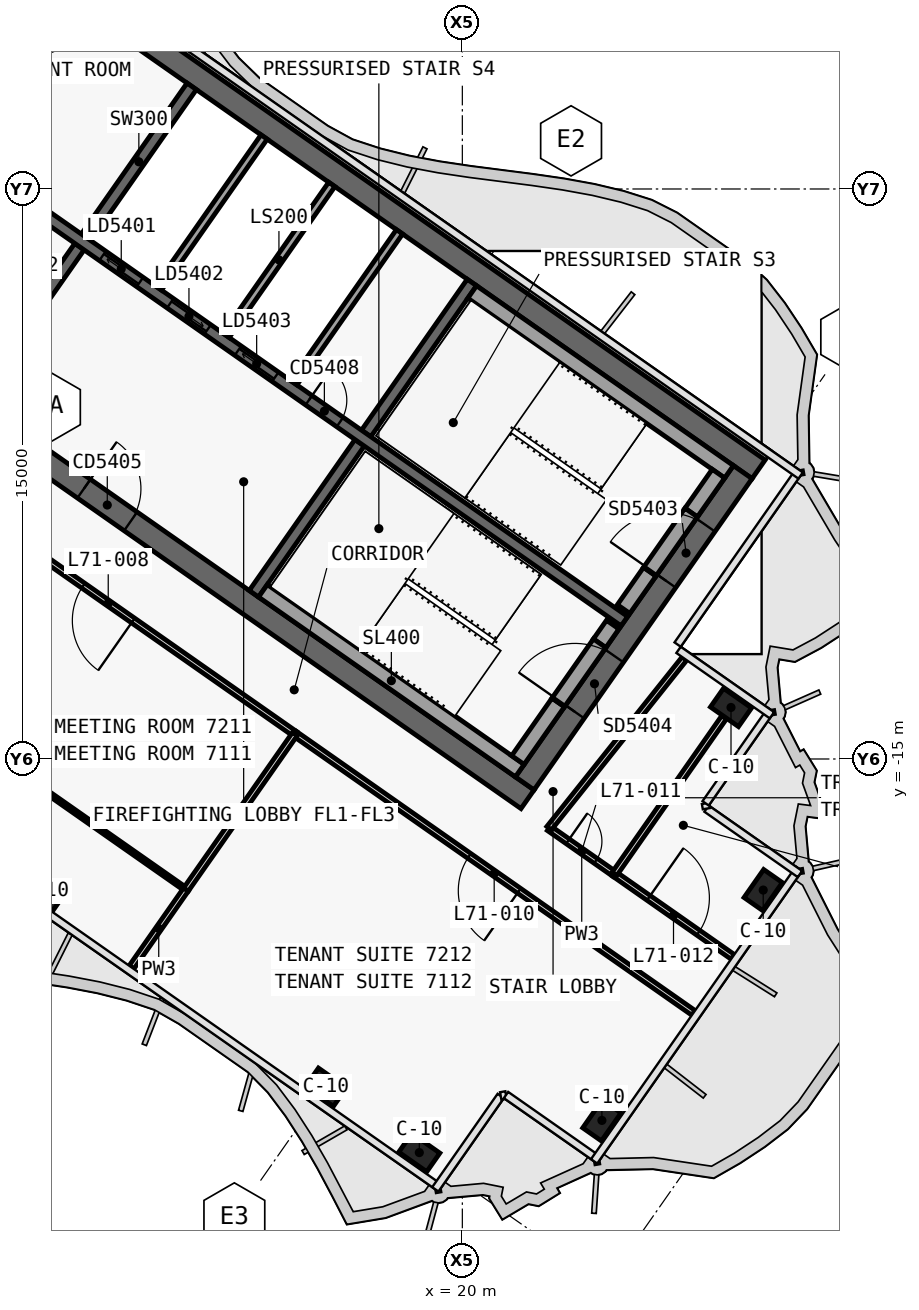
"""IFC4 building model, lengths in metres.
Left out: names, types, materials, properties, quantities, classifications, styles, units other than length and angle.
Written with IfcOpenShell. Run it as: python <this file> out.ifc"""

import sys

from ifc_helpers import new_model, si_unit, direction, frame, frame_2d, origin, origin_2d, place, context, subcontext, project, spatial, polyline, rectangle, outline, extrude, element, fill, save


model = new_model("IFC4")
c1 = context("Model", 3, precision=1e-05, world=origin(), true_north=direction((0.0, 1.0)))
c2 = subcontext(c1, "Body", "Model", "MODEL_VIEW")
j1 = project(units=[si_unit("LENGTHUNIT", "METRE"), si_unit("PLANEANGLEUNIT", "RADIAN")], contexts=[c1])
p1 = place(None, origin())
s1 = spatial("IfcSite", under=j1, at=p1, CompositionType="ELEMENT")
p2 = place(p1, origin())
s2 = spatial("IfcBuilding", under=s1, at=p2, CompositionType="ELEMENT")
p3 = place(p2, frame((0.0, 0.0, 299.5)))
s3 = spatial("IfcBuildingStorey", under=s2, at=p3, CompositionType="ELEMENT", Elevation=299.5)
p4 = place(p3, frame((0.028, 12.066, 0.0), z_axis=(0.0, 0.0, 1.0), x_axis=(0.819151382952, -0.573577380837, 0.0)))
e1 = element("IfcWall", 1, at=p4, inside=s3, PredefinedType="SHEAR", context=c2, shape_type="SweptSolid", body=[
    extrude(outline(polyline([(33.898, 0.3), (0.0, 0.3), (0.42, -0.3), (33.898, -0.3), (33.898, 0.3)])), origin(), (0.0, 0.0, 1.0), 3.9),
])
p5 = place(p3, frame((0.028, -0.874, 0.0), z_axis=(0.0, 0.0, 1.0), x_axis=(0.819150035022, -0.573579305871, 0.0)))
e2 = element("IfcWall", 2, at=p5, inside=s3, PredefinedType="SHEAR", context=c2, shape_type="SweptSolid", body=[
    extrude(outline(polyline([(26.476, 0.3), (0.0, 0.3), (0.42, -0.3), (26.476, -0.3), (26.476, 0.3)])), origin(), (0.0, 0.0, 1.0), 3.9),
])
p6 = place(p5, frame((1.026, 0.0, 0.0)))
e3 = element("IfcOpeningElement", 3, at=p6, cuts=e2, PredefinedType="OPENING", context=c2, shape_type="SweptSolid", body=[
    extrude(rectangle(XDim=1.5, YDim=2.1, at=frame_2d((0.75, 1.05))), frame((0.0, 0.31, 0.0), z_axis=(0.0, -1.0, 0.0), x_axis=(1.0, 0.0, 0.0)), (0.0, 0.0, 1.0), 0.62),
])
p7 = place(p5, frame((12.226, 0.0, 0.0)))
e4 = element("IfcOpeningElement", 4, at=p7, cuts=e2, PredefinedType="OPENING", context=c2, shape_type="SweptSolid", body=[
    extrude(rectangle(XDim=1.5, YDim=2.1, at=frame_2d((0.75, 1.05))), frame((0.0, 0.31, 0.0), z_axis=(0.0, -1.0, 0.0), x_axis=(1.0, 0.0, 0.0)), (0.0, 0.0, 1.0), 0.62),
])
p8 = place(p3, frame((21.642, -15.642, 0.0), z_axis=(0.0, 0.0, 1.0), x_axis=(0.573586866468, 0.819144740944, 0.0)))
e5 = element("IfcWall", 5, at=p8, inside=s3, PredefinedType="SHEAR", context=c2, shape_type="SweptSolid", body=[
    extrude(outline(polyline([(10.0, 0.3), (0.0, 0.3), (0.0, -0.3), (10.0, -0.3), (10.0, 0.3)])), origin(), (0.0, 0.0, 1.0), 3.9),
])
p9 = place(p8, frame((6.5, 0.0, 0.0)))
e6 = element("IfcOpeningElement", 6, at=p9, cuts=e5, PredefinedType="OPENING", context=c2, shape_type="SweptSolid", body=[
    extrude(rectangle(XDim=1.8, YDim=2.1, at=frame_2d((0.9, 1.05))), frame((0.0, 0.31, 0.0), z_axis=(0.0, -1.0, 0.0), x_axis=(1.0, 0.0, 0.0)), (0.0, 0.0, 1.0), 0.62),
])
p10 = place(p8, frame((2.3, 0.0, 0.0)))
e7 = element("IfcOpeningElement", 7, at=p10, cuts=e5, PredefinedType="OPENING", context=c2, shape_type="SweptSolid", body=[
    extrude(rectangle(XDim=1.8, YDim=2.1, at=frame_2d((0.9, 1.05))), frame((0.0, 0.31, 0.0), z_axis=(0.0, -1.0, 0.0), x_axis=(1.0, 0.0, 0.0)), (0.0, 0.0, 1.0), 0.62),
])
p11 = place(p3, frame((7.143, -5.49, 0.0), z_axis=(0.0, 0.0, 1.0), x_axis=(0.573617744349, 0.819123118565, 0.0)))
e8 = element("IfcWall", 8, at=p11, inside=s3, PredefinedType="SHEAR", context=c2, shape_type="SweptSolid", body=[
    extrude(outline(polyline([(0.0, 0.15), (0.0, -0.15), (4.85, -0.15), (4.85, 0.15), (0.0, 0.15)])), origin(), (0.0, 0.0, 1.0), 3.9),
])
p12 = place(p3, frame((10.097, -1.271, 0.0), z_axis=(0.0, 0.0, 1.0), x_axis=(0.573560315113, 0.819163332265, 0.0)))
e9 = element("IfcWall", 9, at=p12, inside=s3, PredefinedType="SHEAR", context=c2, shape_type="SweptSolid", body=[
    extrude(outline(polyline([(4.85, -0.15), (4.85, 0.15), (0.0, 0.15), (0.0, -0.15), (4.85, -0.15)])), origin(), (0.0, 0.0, 1.0), 3.9),
])
p13 = place(p3, frame((14.515, -10.652, 0.0), z_axis=(0.0, 0.0, 1.0), x_axis=(0.573560315113, 0.819163332265, 0.0)))
e10 = element("IfcWall", 10, at=p13, inside=s3, PredefinedType="SHEAR", context=c2, shape_type="SweptSolid", body=[
    extrude(outline(polyline([(0.0, 0.15), (0.0, -0.15), (4.85, -0.15), (4.85, 0.15), (0.0, 0.15)])), origin(), (0.0, 0.0, 1.0), 3.9),
])
p14 = place(p3, frame((17.469, -6.433, 0.0), z_axis=(0.0, 0.0, 1.0), x_axis=(0.573594092424, 0.81913968109, 0.0)))
e11 = element("IfcWall", 11, at=p14, inside=s3, PredefinedType="SHEAR", context=c2, shape_type="SweptSolid", body=[
    extrude(outline(polyline([(4.85, -0.15), (4.85, 0.15), (0.0, 0.15), (0.0, -0.15), (4.85, -0.15)])), origin(), (0.0, 0.0, 1.0), 3.9),
])
p15 = place(p3, frame((2.638, 3.768, 0.0), z_axis=(0.0, 0.0, 1.0), x_axis=(0.819155014212, -0.573572194837, 0.0)))
e12 = element("IfcWall", 12, at=p15, inside=s3, PredefinedType="SHEAR", context=c2, shape_type="SweptSolid", body=[
    extrude(outline(polyline([(0.0, 0.15), (0.0, -0.15), (26.4, -0.15), (26.4, 0.15), (0.0, 0.15)])), origin(), (0.0, 0.0, 1.0), 3.9),
])
p16 = place(p15, frame((9.637, 0.0, 0.0)))
e13 = element("IfcOpeningElement", 13, at=p16, cuts=e12, PredefinedType="OPENING", context=c2, shape_type="SweptSolid", body=[
    extrude(rectangle(XDim=1.2, YDim=2.1, at=frame_2d((0.6, 1.05))), frame((0.0, 0.16, 0.0), z_axis=(0.0, -1.0, 0.0), x_axis=(1.0, 0.0, 0.0)), (0.0, 0.0, 1.0), 0.32),
])
p17 = place(p15, frame((11.812, 0.0, 0.0)))
e14 = element("IfcOpeningElement", 14, at=p17, cuts=e12, PredefinedType="OPENING", context=c2, shape_type="SweptSolid", body=[
    extrude(rectangle(XDim=1.2, YDim=2.1, at=frame_2d((0.6, 1.05))), frame((0.0, 0.16, 0.0), z_axis=(0.0, -1.0, 0.0), x_axis=(1.0, 0.0, 0.0)), (0.0, 0.0, 1.0), 0.32),
])
p18 = place(p15, frame((13.988, 0.0, 0.0)))
e15 = element("IfcOpeningElement", 15, at=p18, cuts=e12, PredefinedType="OPENING", context=c2, shape_type="SweptSolid", body=[
    extrude(rectangle(XDim=1.2, YDim=2.1, at=frame_2d((0.6, 1.05))), frame((0.0, 0.16, 0.0), z_axis=(0.0, -1.0, 0.0), x_axis=(1.0, 0.0, 0.0)), (0.0, 0.0, 1.0), 0.32),
])
p19 = place(p15, frame((16.262, 0.0, 0.0)))
e16 = element("IfcOpeningElement", 16, at=p19, cuts=e12, PredefinedType="OPENING", context=c2, shape_type="SweptSolid", body=[
    extrude(rectangle(XDim=1.0, YDim=2.1, at=frame_2d((0.5, 1.05))), frame((0.0, 0.16, 0.0), z_axis=(0.0, -1.0, 0.0), x_axis=(1.0, 0.0, 0.0)), (0.0, 0.0, 1.0), 0.32),
])
for number, where, z_axis, x_axis in (
    (17, (9.038, -18.475, 0.0), (0.0, 0.0, 1.0), (0.819, -0.574, 0.0)),
    (18, (16.41, -23.637, 0.0), (0.0, 0.0, 1.0), (0.819, -0.574, 0.0)),
    (19, (18.867, -25.358, 0.0), (0.0, 0.0, 1.0), (0.819, -0.574, 0.0)),
    (20, (27.07, -13.644, 0.0), (0.0, 0.0, 1.0), (0.819, -0.574, 0.0)),
    (21, (23.672, -24.51, 0.0), (0.0, 0.0, 1.0), (0.574, 0.819, 0.0)),
    (22, (27.917, -18.449, 0.0), (0.0, 0.0, 1.0), (0.574, 0.819, 0.0)),
):
    element("IfcColumn", number, at=place(p3, frame(where, z_axis=z_axis, x_axis=x_axis)), inside=s3, PredefinedType="COLUMN", context=c2, shape_type="SweptSolid", body=[
        extrude(rectangle(XDim=0.9, YDim=0.6, at=origin_2d()), origin(), (0.0, 0.0, 1.0), 3.9),
    ])
p20 = place(p3, frame((12.001, -2.605, 0.0), z_axis=(0.0, 0.0, 1.0), x_axis=(0.573560315113, 0.819163332265, 0.0)))
e23 = element("IfcWall", 23, at=p20, inside=s3, PredefinedType="SOLIDWALL", context=c2, shape_type="SweptSolid", body=[
    extrude(rectangle(XDim=4.85, YDim=0.2, at=frame_2d((2.425, 0.0))), origin(), (0.0, 0.0, 1.0), 3.9),
])
p21 = place(p3, frame((13.783, -3.852, 0.0), z_axis=(0.0, 0.0, 1.0), x_axis=(0.573594092424, 0.81913968109, 0.0)))
e24 = element("IfcWall", 24, at=p21, inside=s3, PredefinedType="SOLIDWALL", context=c2, shape_type="SweptSolid", body=[
    extrude(rectangle(XDim=4.85, YDim=0.2, at=frame_2d((2.425, 0.0))), origin(), (0.0, 0.0, 1.0), 3.9),
])
p22 = place(p3, frame((15.565, -5.1, 0.0), z_axis=(0.0, 0.0, 1.0), x_axis=(0.573560315113, 0.819163332265, 0.0)))
e25 = element("IfcWall", 25, at=p22, inside=s3, PredefinedType="SOLIDWALL", context=c2, shape_type="SweptSolid", body=[
    extrude(rectangle(XDim=4.85, YDim=0.2, at=frame_2d((2.425, 0.0))), origin(), (0.0, 0.0, 1.0), 3.9),
])
p23 = place(p3, frame((20.259, -2.71, 0.0), z_axis=(0.0, 0.0, 1.0), x_axis=(0.81914849389, -0.573581506813, 0.0)))
e26 = element("IfcWall", 26, at=p23, inside=s3, PredefinedType="SOLIDWALL", context=c2, shape_type="SweptSolid", body=[
    extrude(rectangle(XDim=8.25, YDim=0.4, at=frame_2d((4.125, 0.0))), origin(), (0.0, 0.0, 1.0), 3.62),
])
p24 = place(p3, frame((24.244, -11.055, 0.0), z_axis=(0.0, 0.0, 1.0), x_axis=(0.573571582932, 0.819155442668, 0.0)))
e27 = element("IfcWall", 27, at=p24, inside=s3, PredefinedType="SOLIDWALL", context=c2, shape_type="SweptSolid", body=[
    extrude(rectangle(XDim=1.2, YDim=0.4, at=frame_2d((0.6, 0.0))), origin(), (0.0, 0.0, 1.0), 3.62),
])
p25 = place(p3, frame((26.022, -8.515, 0.0), z_axis=(0.0, 0.0, 1.0), x_axis=(0.573619628835, 0.819121798889, 0.0)))
e28 = element("IfcWall", 28, at=p25, inside=s3, PredefinedType="SOLIDWALL", context=c2, shape_type="SweptSolid", body=[
    extrude(rectangle(XDim=1.25, YDim=0.4, at=frame_2d((0.625, 0.0))), origin(), (0.0, 0.0, 1.0), 3.62),
])
p26 = place(p3, frame((24.932, -10.072, 2.15), z_axis=(0.0, 0.0, 1.0), x_axis=(0.573591692345, 0.819141361715, 0.0)))
e29 = element("IfcWall", 29, at=p26, inside=s3, PredefinedType="SOLIDWALL", context=c2, shape_type="SweptSolid", body=[
    extrude(rectangle(XDim=1.9, YDim=0.4, at=frame_2d((0.95, 0.0))), origin(), (0.0, 0.0, 1.0), 1.47),
])
p27 = place(p3, frame((14.753, -10.574, 0.0), z_axis=(0.0, 0.0, 1.0), x_axis=(0.819158229677, -0.573567602601, 0.0)))
e30 = element("IfcWall", 30, at=p27, inside=s3, PredefinedType="SOLIDWALL", context=c2, shape_type="SweptSolid", body=[
    extrude(rectangle(XDim=8.25, YDim=0.4, at=frame_2d((4.125, 0.0))), origin(), (0.0, 0.0, 1.0), 3.62),
])
p28 = place(p3, frame((21.462, -15.028, 0.0), z_axis=(0.0, 0.0, 1.0), x_axis=(0.573559770908, 0.819163713305, 0.0)))
e31 = element("IfcWall", 31, at=p28, inside=s3, PredefinedType="SOLIDWALL", context=c2, shape_type="SweptSolid", body=[
    extrude(rectangle(XDim=1.85, YDim=0.4, at=frame_2d((0.925, 0.0))), origin(), (0.0, 0.0, 1.0), 3.62),
])
p29 = place(p3, frame((23.613, -11.956, 0.0), z_axis=(0.0, 0.0, 1.0), x_axis=(0.573435029941, 0.819251039936, 0.0)))
e32 = element("IfcWall", 32, at=p29, inside=s3, PredefinedType="SOLIDWALL", context=c2, shape_type="SweptSolid", body=[
    extrude(rectangle(XDim=0.6, YDim=0.4, at=frame_2d((0.3, 0.0))), origin(), (0.0, 0.0, 1.0), 3.62),
])
p30 = place(p3, frame((22.523, -13.512, 2.15), z_axis=(0.0, 0.0, 1.0), x_axis=(0.573591692345, 0.819141361715, 0.0)))
e33 = element("IfcWall", 33, at=p30, inside=s3, PredefinedType="SOLIDWALL", context=c2, shape_type="SweptSolid", body=[
    extrude(rectangle(XDim=1.9, YDim=0.4, at=frame_2d((0.95, 0.0))), origin(), (0.0, 0.0, 1.0), 1.47),
])
p31 = place(p3, frame((22.281, -16.822, 0.0), z_axis=(0.0, 0.0, 1.0), x_axis=(0.819166447083, -0.573555866479, 0.0)))
e34 = element("IfcWall", 34, at=p31, inside=s3, PredefinedType="PARTITIONING", context=c2, shape_type="SweptSolid", body=[
    extrude(rectangle(XDim=2.102, YDim=0.15, at=frame_2d((1.051, 0.0))), origin(), (0.0, 0.0, 1.0), 3.05),
])
p32 = place(p31, frame((0.601, 0.0, 0.0)))
e35 = element("IfcOpeningElement", 35, at=p32, cuts=e34, PredefinedType="OPENING", context=c2, shape_type="SweptSolid", body=[
    extrude(rectangle(XDim=0.9, YDim=2.1, at=frame_2d((0.45, 1.05))), frame((0.0, 0.085, 0.0), z_axis=(0.0, -1.0, 0.0), x_axis=(1.0, 0.0, 0.0)), (0.0, 0.0, 1.0), 0.17),
])
p33 = place(p3, frame((23.999, -18.025, 0.0), z_axis=(0.0, 0.0, 1.0), x_axis=(0.819168564183, -0.573552842775, 0.0)))
e36 = element("IfcWall", 36, at=p33, inside=s3, PredefinedType="PARTITIONING", context=c2, shape_type="SweptSolid", body=[
    extrude(rectangle(XDim=3.802, YDim=0.15, at=frame_2d((1.901, 0.0))), origin(), (0.0, 0.0, 1.0), 3.0),
])
p34 = place(p33, frame((1.101, 0.0, 0.0)))
e37 = element("IfcOpeningElement", 37, at=p34, cuts=e36, PredefinedType="OPENING", context=c2, shape_type="SweptSolid", body=[
    extrude(rectangle(XDim=1.6, YDim=2.1, at=frame_2d((0.8, 1.05))), frame((0.0, 0.085, 0.0), z_axis=(0.0, -1.0, 0.0), x_axis=(1.0, 0.0, 0.0)), (0.0, 0.0, 1.0), 0.17),
])
p35 = place(p3, frame((15.598, -14.34, 0.0), z_axis=(0.0, 0.0, 1.0), x_axis=(-0.81915546166, 0.573571555809, 0.0)))
e38 = element("IfcWall", 38, at=p35, inside=s3, PredefinedType="PARTITIONING", context=c2, shape_type="SweptSolid", body=[
    extrude(rectangle(XDim=12.002, YDim=0.15, at=frame_2d((6.001, 0.0))), origin(), (0.0, 0.0, 1.0), 3.05),
])
p36 = place(p35, frame((5.201, 0.0, 0.0)))
e39 = element("IfcOpeningElement", 39, at=p36, cuts=e38, PredefinedType="OPENING", context=c2, shape_type="SweptSolid", body=[
    extrude(rectangle(XDim=1.6, YDim=2.1, at=frame_2d((0.8, 1.05))), frame((0.0, 0.085, 0.0), z_axis=(0.0, -1.0, 0.0), x_axis=(1.0, 0.0, 0.0)), (0.0, 0.0, 1.0), 0.17),
])
p37 = place(p3, frame((26.081, -21.68, 0.0), z_axis=(0.0, 0.0, 1.0), x_axis=(-0.819158447199, 0.573567291939, 0.0)))
e40 = element("IfcWall", 40, at=p37, inside=s3, PredefinedType="PARTITIONING", context=c2, shape_type="SweptSolid", body=[
    extrude(rectangle(XDim=12.802, YDim=0.15, at=frame_2d((6.401, 0.0))), origin(), (0.0, 0.0, 1.0), 3.0),
])
p38 = place(p37, frame((5.601, 0.0, 0.0)))
e41 = element("IfcOpeningElement", 41, at=p38, cuts=e40, PredefinedType="OPENING", context=c2, shape_type="SweptSolid", body=[
    extrude(rectangle(XDim=1.6, YDim=2.1, at=frame_2d((0.8, 1.05))), frame((0.0, 0.085, 0.0), z_axis=(0.0, -1.0, 0.0), x_axis=(1.0, 0.0, 0.0)), (0.0, 0.0, 1.0), 0.17),
])
p39 = place(p3, frame((26.886, -13.906, 0.0), z_axis=(0.0, 0.0, 1.0), x_axis=(-0.573563323307, -0.819161225985, 0.0)))
e42 = element("IfcWall", 42, at=p39, inside=s3, PredefinedType="PARTITIONING", context=c2, shape_type="SweptSolid", body=[
    extrude(rectangle(XDim=5.03, YDim=0.15, at=frame_2d((2.515, 0.0))), origin(), (0.0, 0.0, 1.0), 3.05),
])
p40 = place(p3, frame((22.282, -16.823, 0.0), z_axis=(0.0, 0.0, 1.0), x_axis=(0.623563137477, 0.781772993637, 0.0)))
e43 = element("IfcWall", 43, at=p40, inside=s3, PredefinedType="PARTITIONING", context=c2, shape_type="SweptSolid", body=[
    extrude(rectangle(XDim=5.711, YDim=0.15, at=frame_2d((2.855, 0.0))), origin(), (0.0, 0.0, 1.0), 3.05),
])
p41 = place(p3, frame((12.728, -18.435, 0.0), z_axis=(0.0, 0.0, 1.0), x_axis=(-0.819156404271, 0.573570209602, 0.0)))
e44 = element("IfcWall", 44, at=p41, inside=s3, PredefinedType="PARTITIONING", context=c2, shape_type="SweptSolid", body=[
    extrude(rectangle(XDim=12.0, YDim=0.1, at=frame_2d((6.0, 0.0))), origin(), (0.0, 0.0, 1.0), 3.05),
])
p42 = place(p41, frame((5.55, 0.0, 0.0)))
e45 = element("IfcOpeningElement", 45, at=p42, cuts=e44, PredefinedType="OPENING", context=c2, shape_type="SweptSolid", body=[
    extrude(rectangle(XDim=0.9, YDim=2.1, at=frame_2d((0.45, 1.05))), frame((0.0, 0.06, 0.0), z_axis=(0.0, -1.0, 0.0), x_axis=(1.0, 0.0, 0.0)), (0.0, 0.0, 1.0), 0.12),
])
p43 = place(p3, frame((12.728, -18.435, 0.0), z_axis=(0.0, 0.0, 1.0), x_axis=(-0.573560689761, -0.819163069945, 0.0)))
e46 = element("IfcWall", 46, at=p43, inside=s3, PredefinedType="PARTITIONING", context=c2, shape_type="SweptSolid", body=[
    extrude(rectangle(XDim=2.499, YDim=0.15, at=frame_2d((1.25, 0.0))), origin(), (0.0, 0.0, 1.0), 3.0),
])
p44 = place(p3, frame((15.596, -14.339, 0.0), z_axis=(0.0, 0.0, 1.0), x_axis=(-0.573563925118, -0.819160804606, 0.0)))
e47 = element("IfcWall", 47, at=p44, inside=s3, PredefinedType="PARTITIONING", context=c2, shape_type="SweptSolid", body=[
    extrude(rectangle(XDim=5.0, YDim=0.15, at=frame_2d((2.5, 0.0))), origin(), (0.0, 0.0, 1.0), 3.62),
])
p45 = place(p16, origin())
e48 = element("IfcDoor", 48, at=p45, inside=s3, OperationType="SLIDING_TO_LEFT", PredefinedType="DOOR", context=c2, shape_type="SweptSolid", body=[
    extrude(rectangle(XDim=1.2, YDim=2.1, at=frame_2d((0.6, 1.05))), frame((0.0, 0.025, 0.0), z_axis=(0.0, -1.0, 0.0), x_axis=(1.0, 0.0, 0.0)), (0.0, 0.0, 1.0), 0.05),
])
fill(e13, e48)
p46 = place(p17, origin())
e49 = element("IfcDoor", 49, at=p46, inside=s3, OperationType="SLIDING_TO_RIGHT", PredefinedType="DOOR", context=c2, shape_type="SweptSolid", body=[
    extrude(rectangle(XDim=1.2, YDim=2.1, at=frame_2d((0.6, 1.05))), frame((0.0, 0.025, 0.0), z_axis=(0.0, -1.0, 0.0), x_axis=(1.0, 0.0, 0.0)), (0.0, 0.0, 1.0), 0.05),
])
fill(e14, e49)
p47 = place(p18, origin())
e50 = element("IfcDoor", 50, at=p47, inside=s3, OperationType="SLIDING_TO_LEFT", PredefinedType="DOOR", context=c2, shape_type="SweptSolid", body=[
    extrude(rectangle(XDim=1.2, YDim=2.1, at=frame_2d((0.6, 1.05))), frame((0.0, 0.025, 0.0), z_axis=(0.0, -1.0, 0.0), x_axis=(1.0, 0.0, 0.0)), (0.0, 0.0, 1.0), 0.05),
])
fill(e15, e50)
p48 = place(p19, origin())
e51 = element("IfcDoor", 51, at=p48, inside=s3, OperationType="SINGLE_SWING_RIGHT", PredefinedType="DOOR", context=c2, shape_type="SweptSolid", body=[
    extrude(rectangle(XDim=1.0, YDim=2.1, at=frame_2d((0.5, 1.05))), frame((0.0, 0.025, 0.0), z_axis=(0.0, -1.0, 0.0), x_axis=(1.0, 0.0, 0.0)), (0.0, 0.0, 1.0), 0.05),
])
fill(e16, e51)
p49 = place(p7, origin())
e52 = element("IfcDoor", 52, at=p49, inside=s3, OperationType="DOUBLE_DOOR_SINGLE_SWING", PredefinedType="DOOR", context=c2, shape_type="SweptSolid", body=[
    extrude(rectangle(XDim=1.5, YDim=2.1, at=frame_2d((0.75, 1.05))), frame((0.0, 0.025, 0.0), z_axis=(0.0, -1.0, 0.0), x_axis=(1.0, 0.0, 0.0)), (0.0, 0.0, 1.0), 0.05),
])
fill(e4, e52)
p50 = place(p9, origin())
e53 = element("IfcDoor", 53, at=p50, inside=s3, OperationType="DOUBLE_DOOR_SINGLE_SWING", PredefinedType="DOOR", context=c2, shape_type="SweptSolid", body=[
    extrude(rectangle(XDim=1.8, YDim=2.1, at=frame_2d((0.9, 1.05))), frame((0.0, 0.025, 0.0), z_axis=(0.0, -1.0, 0.0), x_axis=(1.0, 0.0, 0.0)), (0.0, 0.0, 1.0), 0.05),
])
fill(e6, e53)
p51 = place(p10, origin())
e54 = element("IfcDoor", 54, at=p51, inside=s3, OperationType="DOUBLE_DOOR_SINGLE_SWING", PredefinedType="DOOR", context=c2, shape_type="SweptSolid", body=[
    extrude(rectangle(XDim=1.8, YDim=2.1, at=frame_2d((0.9, 1.05))), frame((0.0, 0.025, 0.0), z_axis=(0.0, -1.0, 0.0), x_axis=(1.0, 0.0, 0.0)), (0.0, 0.0, 1.0), 0.05),
])
fill(e7, e54)
p52 = place(p36, origin())
e55 = element("IfcDoor", 55, at=p52, inside=s3, OperationType="DOUBLE_DOOR_SINGLE_SWING", PredefinedType="DOOR", context=c2, shape_type="SweptSolid", body=[
    extrude(rectangle(XDim=1.6, YDim=2.1, at=frame_2d((0.8, 1.05))), frame((0.0, 0.025, 0.0), z_axis=(0.0, -1.0, 0.0), x_axis=(1.0, 0.0, 0.0)), (0.0, 0.0, 1.0), 0.05),
])
fill(e39, e55)
p53 = place(p38, origin())
e56 = element("IfcDoor", 56, at=p53, inside=s3, OperationType="DOUBLE_DOOR_SINGLE_SWING", PredefinedType="DOOR", context=c2, shape_type="SweptSolid", body=[
    extrude(rectangle(XDim=1.6, YDim=2.1, at=frame_2d((0.8, 1.05))), frame((0.0, 0.025, 0.0), z_axis=(0.0, -1.0, 0.0), x_axis=(1.0, 0.0, 0.0)), (0.0, 0.0, 1.0), 0.05),
])
fill(e41, e56)
p54 = place(p32, origin())
e57 = element("IfcDoor", 57, at=p54, inside=s3, OperationType="SINGLE_SWING_RIGHT", PredefinedType="DOOR", context=c2, shape_type="SweptSolid", body=[
    extrude(rectangle(XDim=0.9, YDim=2.1, at=frame_2d((0.45, 1.05))), frame((0.0, 0.025, 0.0), z_axis=(0.0, -1.0, 0.0), x_axis=(1.0, 0.0, 0.0)), (0.0, 0.0, 1.0), 0.05),
])
fill(e35, e57)
p55 = place(p34, origin())
e58 = element("IfcDoor", 58, at=p55, inside=s3, OperationType="DOUBLE_DOOR_SINGLE_SWING", PredefinedType="DOOR", context=c2, shape_type="SweptSolid", body=[
    extrude(rectangle(XDim=1.6, YDim=2.1, at=frame_2d((0.8, 1.05))), frame((0.0, 0.025, 0.0), z_axis=(0.0, -1.0, 0.0), x_axis=(1.0, 0.0, 0.0)), (0.0, 0.0, 1.0), 0.05),
])
fill(e37, e58)
save(model, sys.argv[1])
